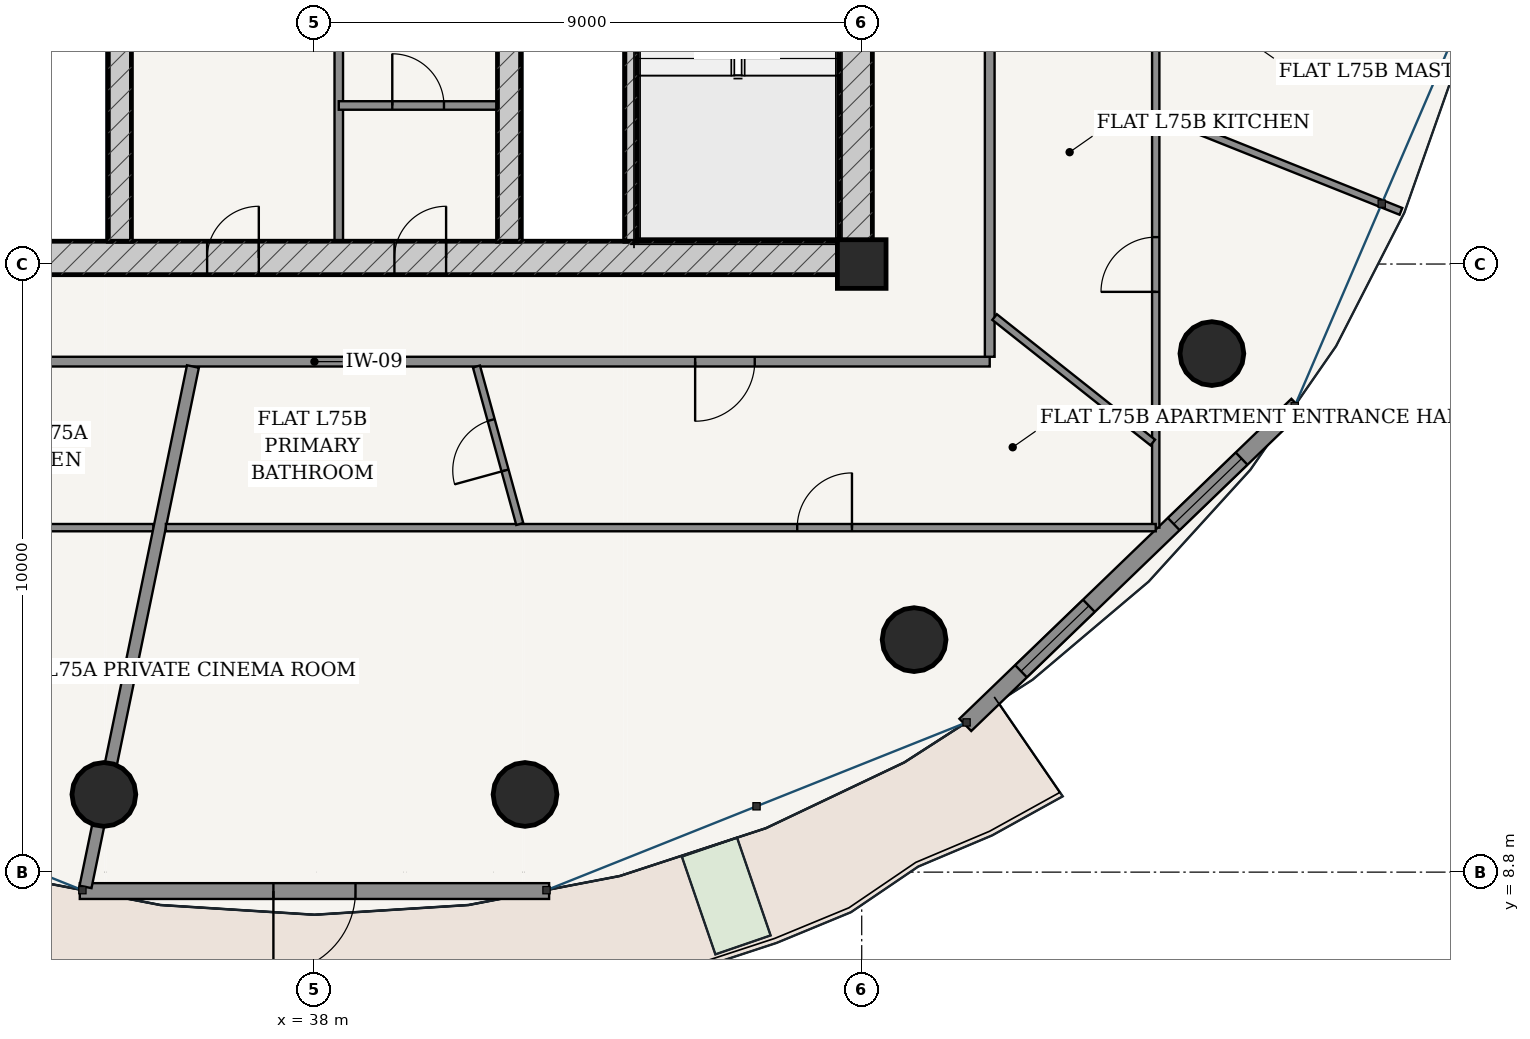
"""IFC4 building model, lengths in metres.
Left out: names, types, materials, properties, quantities, classifications, styles, units other than length and angle.
Written with IfcOpenShell. Run it as: python <this file> out.ifc"""

import sys

from ifc_helpers import new_model, si_unit, direction, frame, frame_2d, origin, origin_2d, place, context, subcontext, project, spatial, rectangle, hollow_circle, extrude, source, transform, mapped, element, fill, save


model = new_model("IFC4")
c1 = context("Model", 3, precision=1e-05, world=origin(), true_north=direction((-0.2419218956, 0.970295726276)))
c2 = subcontext(c1, "Body", "Model", "MODEL_VIEW")
j1 = project(units=[si_unit("LENGTHUNIT", "METRE"), si_unit("PLANEANGLEUNIT", "RADIAN")], contexts=[c1])
p1 = place(None, origin())
s1 = spatial("IfcSite", under=j1, at=p1, CompositionType="ELEMENT")
p2 = place(p1, origin())
s2 = spatial("IfcBuilding", under=s1, at=p2, CompositionType="ELEMENT")
p3 = place(p2, frame((0.0, 0.0, 285.7)))
s3 = spatial("IfcBuildingStorey", under=s2, at=p3, CompositionType="ELEMENT", Elevation=285.7)
p4 = place(p3, frame((47.0, 18.8, 0.0), z_axis=(0.0, 0.0, 1.0), x_axis=(1.0, 0.0, 0.0)))
e1 = element("IfcColumn", 1, at=p4, inside=s3, PredefinedType="COLUMN", context=c2, shape_type="SweptSolid", body=[
    extrude(rectangle(XDim=0.8, YDim=0.8, at=origin_2d()), origin(), (0.0, 0.0, 1.0), 3.75),
])
p5 = place(p3, frame((28.825, 18.9, 0.0), z_axis=(0.0, 0.0, 1.0), x_axis=(1.0, 0.0, 0.0)))
e2 = element("IfcWall", 2, at=p5, inside=s3, PredefinedType="SHEAR", context=c2, shape_type="SweptSolid", body=[
    extrude(rectangle(XDim=18.35, YDim=0.55, at=frame_2d((9.175, 0.0))), origin(), (0.0, 0.0, 1.0), 3.49),
])
p6 = place(p5, frame((7.41, 0.0, 0.0)))
e3 = element("IfcOpeningElement", 3, at=p6, cuts=e2, PredefinedType="OPENING", context=c2, shape_type="SweptSolid", body=[
    extrude(rectangle(XDim=0.85, YDim=2.1, at=frame_2d((0.425, 1.05))), frame((0.0, 0.285, 0.0), z_axis=(0.0, -1.0, 0.0), x_axis=(1.0, 0.0, 0.0)), (0.0, 0.0, 1.0), 0.57),
])
p7 = place(p5, frame((10.49, 0.0, 0.0)))
e4 = element("IfcOpeningElement", 4, at=p7, cuts=e2, PredefinedType="OPENING", context=c2, shape_type="SweptSolid", body=[
    extrude(rectangle(XDim=0.85, YDim=2.1, at=frame_2d((0.425, 1.05))), frame((0.0, 0.285, 0.0), z_axis=(0.0, -1.0, 0.0), x_axis=(1.0, 0.0, 0.0)), (0.0, 0.0, 1.0), 0.57),
])
p8 = place(p3, frame((46.9, 19.175, 0.0), z_axis=(0.0, 0.0, 1.0), x_axis=(0.0, 1.0, 0.0)))
e5 = element("IfcWall", 5, at=p8, inside=s3, PredefinedType="SHEAR", context=c2, shape_type="SweptSolid", body=[
    extrude(rectangle(XDim=15.25, YDim=0.55, at=frame_2d((7.625, 0.0))), origin(), (0.0, 0.0, 1.0), 3.49),
])
p9 = place(p8, frame((9.875, 0.0, 0.0)))
e6 = element("IfcOpeningElement", 6, at=p9, cuts=e5, PredefinedType="OPENING", context=c2, shape_type="SweptSolid", body=[
    extrude(rectangle(XDim=1.5, YDim=2.2, at=frame_2d((0.75, 1.1))), frame((0.0, 0.285, 0.0), z_axis=(0.0, -1.0, 0.0), x_axis=(1.0, 0.0, 0.0)), (0.0, 0.0, 1.0), 0.57),
])
p10 = place(p3, frame((43.205, 19.175, 0.0), z_axis=(0.0, 0.0, 1.0), x_axis=(0.0, 1.0, 0.0)))
e7 = element("IfcWall", 7, at=p10, inside=s3, PredefinedType="SOLIDWALL", context=c2, shape_type="SweptSolid", body=[
    extrude(rectangle(XDim=7.375, YDim=0.2, at=frame_2d((3.688, 0.0))), origin(), (0.0, 0.0, 1.0), 3.49),
])
p11 = place(p3, frame((34.8, 19.175, 0.0), z_axis=(0.0, 0.0, 1.0), x_axis=(0.0, 1.0, 0.0)))
e8 = element("IfcWall", 8, at=p11, inside=s3, PredefinedType="SHEAR", context=c2, shape_type="SweptSolid", body=[
    extrude(rectangle(XDim=15.25, YDim=0.38, at=frame_2d((7.625, 0.0))), origin(), (0.0, 0.0, 1.0), 3.49),
])
p12 = place(p11, frame((7.8, 0.0, 0.0)))
e9 = element("IfcOpeningElement", 9, at=p12, cuts=e8, PredefinedType="OPENING", context=c2, shape_type="SweptSolid", body=[
    extrude(rectangle(XDim=1.05, YDim=2.15, at=frame_2d((0.525, 1.075))), frame((0.0, 0.2, 0.0), z_axis=(0.0, -1.0, 0.0), x_axis=(1.0, 0.0, 0.0)), (0.0, 0.0, 1.0), 0.4),
])
p13 = place(p3, frame((41.2, 19.175, 0.0), z_axis=(0.0, 0.0, 1.0), x_axis=(0.0, 1.0, 0.0)))
e10 = element("IfcWall", 10, at=p13, inside=s3, PredefinedType="SHEAR", context=c2, shape_type="SweptSolid", body=[
    extrude(rectangle(XDim=15.25, YDim=0.38, at=frame_2d((7.625, 0.0))), origin(), (0.0, 0.0, 1.0), 3.49),
])
p14 = place(p13, frame((7.8, 0.0, 0.0)))
e11 = element("IfcOpeningElement", 11, at=p14, cuts=e10, PredefinedType="OPENING", context=c2, shape_type="SweptSolid", body=[
    extrude(rectangle(XDim=1.05, YDim=2.15, at=frame_2d((0.525, 1.075))), frame((0.0, 0.2, 0.0), z_axis=(0.0, -1.0, 0.0), x_axis=(1.0, 0.0, 0.0)), (0.0, 0.0, 1.0), 0.4),
])
for number, where, z_axis, x_axis in (
    (12, (34.537, 10.078, 0.0), (0.0, 0.0, 1.0), (1.0, 0.0, 0.0)),
    (13, (41.463, 10.078, 0.0), (0.0, 0.0, 1.0), (1.0, 0.0, 0.0)),
    (14, (47.861, 12.624, 0.0), (0.0, 0.0, 1.0), (1.0, 0.0, 0.0)),
    (15, (52.759, 17.328, 0.0), (0.0, 0.0, 1.0), (1.0, 0.0, 0.0)),
):
    element("IfcColumn", number, at=place(p3, frame(where, z_axis=z_axis, x_axis=x_axis)), inside=s3, PredefinedType="COLUMN", context=c2, shape_type="SweptSolid", body=[
        extrude(hollow_circle(Radius=0.525, WallThickness=0.035, at=origin_2d()), origin(), (0.0, 0.0, 1.0), 3.75),
    ])
p15 = place(p3, frame((34.141, 8.489, 0.0), z_axis=(0.0, 0.0, 1.0), x_axis=(1.0, 0.0, 0.0)))
e16 = element("IfcWall", 16, at=p15, inside=s3, PredefinedType="SOLIDWALL", context=c2, shape_type="SweptSolid", body=[
    extrude(rectangle(XDim=7.718, YDim=0.26, at=frame_2d((3.859, 0.0))), origin(), (0.0, 0.0, 1.0), 3.49),
])
p16 = place(p15, frame((3.184, 0.0, 0.0)))
e17 = element("IfcOpeningElement", 17, at=p16, cuts=e16, PredefinedType="OPENING", context=c2, shape_type="SweptSolid", body=[
    extrude(rectangle(XDim=1.35, YDim=2.2, at=frame_2d((0.675, 1.1))), frame((0.0, 0.14, 0.0), z_axis=(0.0, -1.0, 0.0), x_axis=(1.0, 0.0, 0.0)), (0.0, 0.0, 1.0), 0.28),
])
p17 = place(p3, frame((48.704, 11.221, 0.0), z_axis=(0.0, 0.0, 1.0), x_axis=(0.719995397366, 0.69397883813, 0.0)))
e18 = element("IfcWall", 18, at=p17, inside=s3, PredefinedType="SOLIDWALL", context=c2, shape_type="SweptSolid", body=[
    extrude(rectangle(XDim=7.582, YDim=0.28, at=frame_2d((3.791, 0.0))), origin(), (0.0, 0.0, 1.0), 3.49),
])
p18 = place(p17, frame((1.272, 0.0, 0.85)))
e19 = element("IfcOpeningElement", 19, at=p18, cuts=e18, PredefinedType="OPENING", context=c2, shape_type="SweptSolid", body=[
    extrude(rectangle(XDim=1.55, YDim=1.95, at=frame_2d((0.775, 0.975))), frame((0.0, 0.15, 0.0), z_axis=(0.0, -1.0, 0.0), x_axis=(1.0, 0.0, 0.0)), (0.0, 0.0, 1.0), 0.3),
])
p19 = place(p17, frame((4.76, 0.0, 0.85)))
e20 = element("IfcOpeningElement", 20, at=p19, cuts=e18, PredefinedType="OPENING", context=c2, shape_type="SweptSolid", body=[
    extrude(rectangle(XDim=1.55, YDim=1.95, at=frame_2d((0.775, 0.975))), frame((0.0, 0.15, 0.0), z_axis=(0.0, -1.0, 0.0), x_axis=(1.0, 0.0, 0.0)), (0.0, 0.0, 1.0), 0.3),
])
p20 = place(p3, frame((38.4, 19.175, 0.0), z_axis=(0.0, 0.0, 1.0), x_axis=(0.0, 1.0, 0.0)))
e21 = element("IfcWall", 21, at=p20, inside=s3, PredefinedType="PARTITIONING", context=c2, shape_type="SweptSolid", body=[
    extrude(rectangle(XDim=4.465, YDim=0.14, at=frame_2d((2.232, 0.0))), origin(), (0.0, 0.0, 1.0), 3.49),
])
p21 = place(p3, frame((38.4, 21.407, 0.0), z_axis=(0.0, 0.0, 1.0), x_axis=(1.0, 0.0, 0.0)))
e22 = element("IfcWall", 22, at=p21, inside=s3, PredefinedType="PARTITIONING", context=c2, shape_type="SweptSolid", body=[
    extrude(rectangle(XDim=2.61, YDim=0.14, at=frame_2d((1.305, 0.0))), origin(), (0.0, 0.0, 1.0), 3.49),
])
p22 = place(p21, frame((0.88, 0.0, 0.0)))
e23 = element("IfcOpeningElement", 23, at=p22, cuts=e22, PredefinedType="OPENING", context=c2, shape_type="SweptSolid", body=[
    extrude(rectangle(XDim=0.85, YDim=2.1, at=frame_2d((0.425, 1.05))), frame((0.0, 0.08, 0.0), z_axis=(0.0, -1.0, 0.0), x_axis=(1.0, 0.0, 0.0)), (0.0, 0.0, 1.0), 0.16),
])
p23 = place(p3, frame((26.895, 17.195, 0.0), z_axis=(0.0, 0.0, 1.0), x_axis=(1.0, 0.0, 0.0)))
e24 = element("IfcWall", 24, at=p23, inside=s3, PredefinedType="PARTITIONING", context=c2, shape_type="SweptSolid", body=[
    extrude(rectangle(XDim=22.21, YDim=0.16, at=frame_2d((11.105, 0.0))), origin(), (0.0, 0.0, 1.0), 3.015),
])
p24 = place(p23, frame((17.365, 0.0, 0.0)))
e25 = element("IfcOpeningElement", 25, at=p24, cuts=e24, PredefinedType="OPENING", context=c2, shape_type="SweptSolid", body=[
    extrude(rectangle(XDim=0.98, YDim=2.2, at=frame_2d((0.49, 1.1))), frame((0.0, 0.09, 0.0), z_axis=(0.0, -1.0, 0.0), x_axis=(1.0, 0.0, 0.0)), (0.0, 0.0, 1.0), 0.18),
])
p25 = place(p3, frame((49.105, 17.275, 0.0), z_axis=(0.0, 0.0, 1.0), x_axis=(0.0, 1.0, 0.0)))
e26 = element("IfcWall", 26, at=p25, inside=s3, PredefinedType="PARTITIONING", context=c2, shape_type="SweptSolid", body=[
    extrude(rectangle(XDim=13.925, YDim=0.16, at=frame_2d((6.962, 0.0))), origin(), (0.0, 0.0, 1.0), 3.015),
])
p26 = place(p3, frame((35.353, 14.465, 0.0), z_axis=(0.0, 0.0, 1.0), x_axis=(-1.0, 0.0, 0.0)))
e27 = element("IfcWall", 27, at=p26, inside=s3, PredefinedType="PARTITIONING", context=c2, shape_type="SweptSolid", body=[
    extrude(rectangle(XDim=11.188, YDim=0.12, at=frame_2d((5.594, 0.0))), origin(), (0.0, 0.0, 1.0), 3.015),
])
p27 = place(p26, frame((3.997, 0.0, 0.0)))
e28 = element("IfcOpeningElement", 28, at=p27, cuts=e27, PredefinedType="OPENING", context=c2, shape_type="SweptSolid", body=[
    extrude(rectangle(XDim=0.9, YDim=2.15, at=frame_2d((0.45, 1.075))), frame((0.0, 0.07, 0.0), z_axis=(0.0, -1.0, 0.0), x_axis=(1.0, 0.0, 0.0)), (0.0, 0.0, 1.0), 0.14),
])
p28 = place(p3, frame((36.001, 17.115, 0.0), z_axis=(0.0, 0.0, 1.0), x_axis=(-0.202108543081, -0.979363128167, 0.0)))
e29 = element("IfcWall", 29, at=p28, inside=s3, PredefinedType="PARTITIONING", context=c2, shape_type="SweptSolid", body=[
    extrude(rectangle(XDim=8.739, YDim=0.2, at=frame_2d((4.369, 0.0))), origin(), (0.0, 0.0, 1.0), 3.015),
])
p29 = place(p3, frame((51.835, 34.01, 0.0), z_axis=(0.0, 0.0, 1.0), x_axis=(0.0, -1.0, 0.0)))
e30 = element("IfcWall", 30, at=p29, inside=s3, PredefinedType="PARTITIONING", context=c2, shape_type="SweptSolid", body=[
    extrude(rectangle(XDim=19.545, YDim=0.12, at=frame_2d((9.772, 0.0))), origin(), (0.0, 0.0, 1.0), 3.015),
])
p30 = place(p29, frame((14.768, 0.0, 0.0)))
e31 = element("IfcOpeningElement", 31, at=p30, cuts=e30, PredefinedType="OPENING", context=c2, shape_type="SweptSolid", body=[
    extrude(rectangle(XDim=0.9, YDim=2.15, at=frame_2d((0.45, 1.075))), frame((0.0, 0.07, 0.0), z_axis=(0.0, -1.0, 0.0), x_axis=(1.0, 0.0, 0.0)), (0.0, 0.0, 1.0), 0.14),
])
p31 = place(p29, frame((8.718, 0.0, 0.0)))
e32 = element("IfcOpeningElement", 32, at=p31, cuts=e30, PredefinedType="OPENING", context=c2, shape_type="SweptSolid", body=[
    extrude(rectangle(XDim=0.9, YDim=2.15, at=frame_2d((0.45, 1.075))), frame((0.0, 0.07, 0.0), z_axis=(0.0, -1.0, 0.0), x_axis=(1.0, 0.0, 0.0)), (0.0, 0.0, 1.0), 0.14),
])
p32 = place(p29, frame((4.14, 0.0, 0.0)))
e33 = element("IfcOpeningElement", 33, at=p32, cuts=e30, PredefinedType="OPENING", context=c2, shape_type="SweptSolid", body=[
    extrude(rectangle(XDim=0.9, YDim=2.15, at=frame_2d((0.45, 1.075))), frame((0.0, 0.07, 0.0), z_axis=(0.0, -1.0, 0.0), x_axis=(1.0, 0.0, 0.0)), (0.0, 0.0, 1.0), 0.14),
])
p33 = place(p3, frame((51.835, 14.465, 0.0), z_axis=(0.0, 0.0, 1.0), x_axis=(-1.0, 0.0, 0.0)))
e34 = element("IfcWall", 34, at=p33, inside=s3, PredefinedType="PARTITIONING", context=c2, shape_type="SweptSolid", body=[
    extrude(rectangle(XDim=16.278, YDim=0.12, at=frame_2d((8.139, 0.0))), origin(), (0.0, 0.0, 1.0), 3.015),
])
p34 = place(p33, frame((4.996, 0.0, 0.0)))
e35 = element("IfcOpeningElement", 35, at=p34, cuts=e34, PredefinedType="OPENING", context=c2, shape_type="SweptSolid", body=[
    extrude(rectangle(XDim=0.9, YDim=2.15, at=frame_2d((0.45, 1.075))), frame((0.0, 0.07, 0.0), z_axis=(0.0, -1.0, 0.0), x_axis=(1.0, 0.0, 0.0)), (0.0, 0.0, 1.0), 0.14),
])
p35 = place(p3, frame((51.893, 21.253, 0.0), z_axis=(0.0, 0.0, 1.0), x_axis=(0.928712556691, -0.370800467966, 0.0)))
e36 = element("IfcWall", 36, at=p35, inside=s3, PredefinedType="PARTITIONING", context=c2, shape_type="SweptSolid", body=[
    extrude(rectangle(XDim=4.28, YDim=0.12, at=frame_2d((2.14, 0.0))), origin(), (0.0, 0.0, 1.0), 3.121),
])
p36 = place(p3, frame((40.664, 17.115, 0.0), z_axis=(0.0, 0.0, 1.0), x_axis=(0.265177604745, -0.964199584081, 0.0)))
e37 = element("IfcWall", 37, at=p36, inside=s3, PredefinedType="PARTITIONING", context=c2, shape_type="SweptSolid", body=[
    extrude(rectangle(XDim=2.687, YDim=0.12, at=frame_2d((1.343, 0.0))), origin(), (0.0, 0.0, 1.0), 3.209),
])
p37 = place(p36, frame((0.913, 0.0, 0.0)))
e38 = element("IfcOpeningElement", 38, at=p37, cuts=e37, PredefinedType="OPENING", context=c2, shape_type="SweptSolid", body=[
    extrude(rectangle(XDim=0.86, YDim=2.15, at=frame_2d((0.43, 1.075))), frame((0.0, 0.07, 0.0), z_axis=(0.0, -1.0, 0.0), x_axis=(1.0, 0.0, 0.0)), (0.0, 0.0, 1.0), 0.14),
])
p38 = place(p3, frame((49.185, 17.928, 0.0), z_axis=(0.0, 0.0, 1.0), x_axis=(0.78348039615, -0.621416501912, 0.0)))
e39 = element("IfcWall", 39, at=p38, inside=s3, PredefinedType="PARTITIONING", context=c2, shape_type="SweptSolid", body=[
    extrude(rectangle(XDim=3.32, YDim=0.12, at=frame_2d((1.66, 0.0))), origin(), (0.0, 0.0, 1.0), 3.121),
])
m1 = source(origin(), c2, "Body", "SweptSolid", [
    extrude(rectangle(XDim=1.35, YDim=2.2, at=frame_2d((0.675, 1.1))), frame((0.0, 0.025, 0.0), z_axis=(0.0, -1.0, 0.0), x_axis=(1.0, 0.0, 0.0)), (0.0, 0.0, 1.0), 0.05),
])
p39 = place(p16, frame((1.35, 0.0, 0.0), z_axis=(0.0, 0.0, 1.0), x_axis=(-1.0, 0.0, 0.0)))
e40 = element("IfcDoor", 40, at=p39, inside=s3, OperationType="SINGLE_SWING_RIGHT", PredefinedType="DOOR", context=c2, shape_type="MappedRepresentation", body=[
    mapped(m1, transform((0.0, 0.0, 0.0), scale=1.0)),
])
fill(e17, e40)
m2 = source(origin(), c2, "Body", "SweptSolid", [
    extrude(rectangle(XDim=1.55, YDim=1.95, at=frame_2d((0.775, 0.975))), frame((0.0, 0.03, 0.0), z_axis=(0.0, -1.0, 0.0), x_axis=(1.0, 0.0, 0.0)), (0.0, 0.0, 1.0), 0.06),
])
p40 = place(p18, origin())
e41 = element("IfcWindow", 41, at=p40, inside=s3, PartitioningType="SINGLE_PANEL", PredefinedType="WINDOW", context=c2, shape_type="MappedRepresentation", body=[
    mapped(m2, transform((0.0, 0.0, 0.0), scale=1.0)),
])
fill(e19, e41)
p41 = place(p19, origin())
e42 = element("IfcWindow", 42, at=p41, inside=s3, PartitioningType="SINGLE_PANEL", PredefinedType="WINDOW", context=c2, shape_type="MappedRepresentation", body=[
    mapped(m2, transform((0.0, 0.0, 0.0), scale=1.0)),
])
fill(e20, e42)
m3 = source(origin(), c2, "Body", "SweptSolid", [
    extrude(rectangle(XDim=0.85, YDim=2.1, at=frame_2d((0.425, 1.05))), frame((0.0, 0.025, 0.0), z_axis=(0.0, -1.0, 0.0), x_axis=(1.0, 0.0, 0.0)), (0.0, 0.0, 1.0), 0.05),
])
p42 = place(p6, origin())
e43 = element("IfcDoor", 43, at=p42, inside=s3, OperationType="SINGLE_SWING_RIGHT", PredefinedType="DOOR", context=c2, shape_type="MappedRepresentation", body=[
    mapped(m3, transform((0.0, 0.0, 0.0), scale=1.0)),
])
fill(e3, e43)
p43 = place(p7, origin())
e44 = element("IfcDoor", 44, at=p43, inside=s3, OperationType="SINGLE_SWING_RIGHT", PredefinedType="DOOR", context=c2, shape_type="MappedRepresentation", body=[
    mapped(m3, transform((0.0, 0.0, 0.0), scale=1.0)),
])
fill(e4, e44)
p44 = place(p22, origin())
e45 = element("IfcDoor", 45, at=p44, inside=s3, OperationType="SINGLE_SWING_LEFT", PredefinedType="DOOR", context=c2, shape_type="MappedRepresentation", body=[
    mapped(m3, transform((0.0, 0.0, 0.0), scale=1.0)),
])
fill(e23, e45)
m4 = source(origin(), c2, "Body", "SweptSolid", [
    extrude(rectangle(XDim=0.98, YDim=2.2, at=frame_2d((0.49, 1.1))), frame((0.0, 0.025, 0.0), z_axis=(0.0, -1.0, 0.0), x_axis=(1.0, 0.0, 0.0)), (0.0, 0.0, 1.0), 0.05),
])
p45 = place(p24, frame((0.98, 0.0, 0.0), z_axis=(0.0, 0.0, 1.0), x_axis=(-1.0, 0.0, 0.0)))
e46 = element("IfcDoor", 46, at=p45, inside=s3, OperationType="SINGLE_SWING_RIGHT", PredefinedType="DOOR", context=c2, shape_type="MappedRepresentation", body=[
    mapped(m4, transform((0.0, 0.0, 0.0), scale=1.0)),
])
fill(e25, e46)
m5 = source(origin(), c2, "Body", "SweptSolid", [
    extrude(rectangle(XDim=0.86, YDim=2.15, at=frame_2d((0.43, 1.075))), frame((0.0, 0.025, 0.0), z_axis=(0.0, -1.0, 0.0), x_axis=(1.0, 0.0, 0.0)), (0.0, 0.0, 1.0), 0.05),
])
p46 = place(p37, frame((0.86, 0.0, 0.0), z_axis=(0.0, 0.0, 1.0), x_axis=(-1.0, 0.0, 0.0)))
e47 = element("IfcDoor", 47, at=p46, inside=s3, OperationType="SINGLE_SWING_LEFT", PredefinedType="DOOR", context=c2, shape_type="MappedRepresentation", body=[
    mapped(m5, transform((0.0, 0.0, 0.0), scale=1.0)),
])
fill(e38, e47)
m6 = source(origin(), c2, "Body", "SweptSolid", [
    extrude(rectangle(XDim=0.9, YDim=2.15, at=frame_2d((0.45, 1.075))), frame((0.0, 0.025, 0.0), z_axis=(0.0, -1.0, 0.0), x_axis=(1.0, 0.0, 0.0)), (0.0, 0.0, 1.0), 0.05),
])
p47 = place(p34, frame((0.9, 0.0, 0.0), z_axis=(0.0, 0.0, 1.0), x_axis=(-1.0, 0.0, 0.0)))
e48 = element("IfcDoor", 48, at=p47, inside=s3, OperationType="SINGLE_SWING_RIGHT", PredefinedType="DOOR", context=c2, shape_type="MappedRepresentation", body=[
    mapped(m6, transform((0.0, 0.0, 0.0), scale=1.0)),
])
fill(e35, e48)
p48 = place(p30, frame((0.9, 0.0, 0.0), z_axis=(0.0, 0.0, 1.0), x_axis=(-1.0, 0.0, 0.0)))
e49 = element("IfcDoor", 49, at=p48, inside=s3, OperationType="SINGLE_SWING_LEFT", PredefinedType="DOOR", context=c2, shape_type="MappedRepresentation", body=[
    mapped(m6, transform((0.0, 0.0, 0.0), scale=1.0)),
])
fill(e31, e49)
save(model, sys.argv[1])
